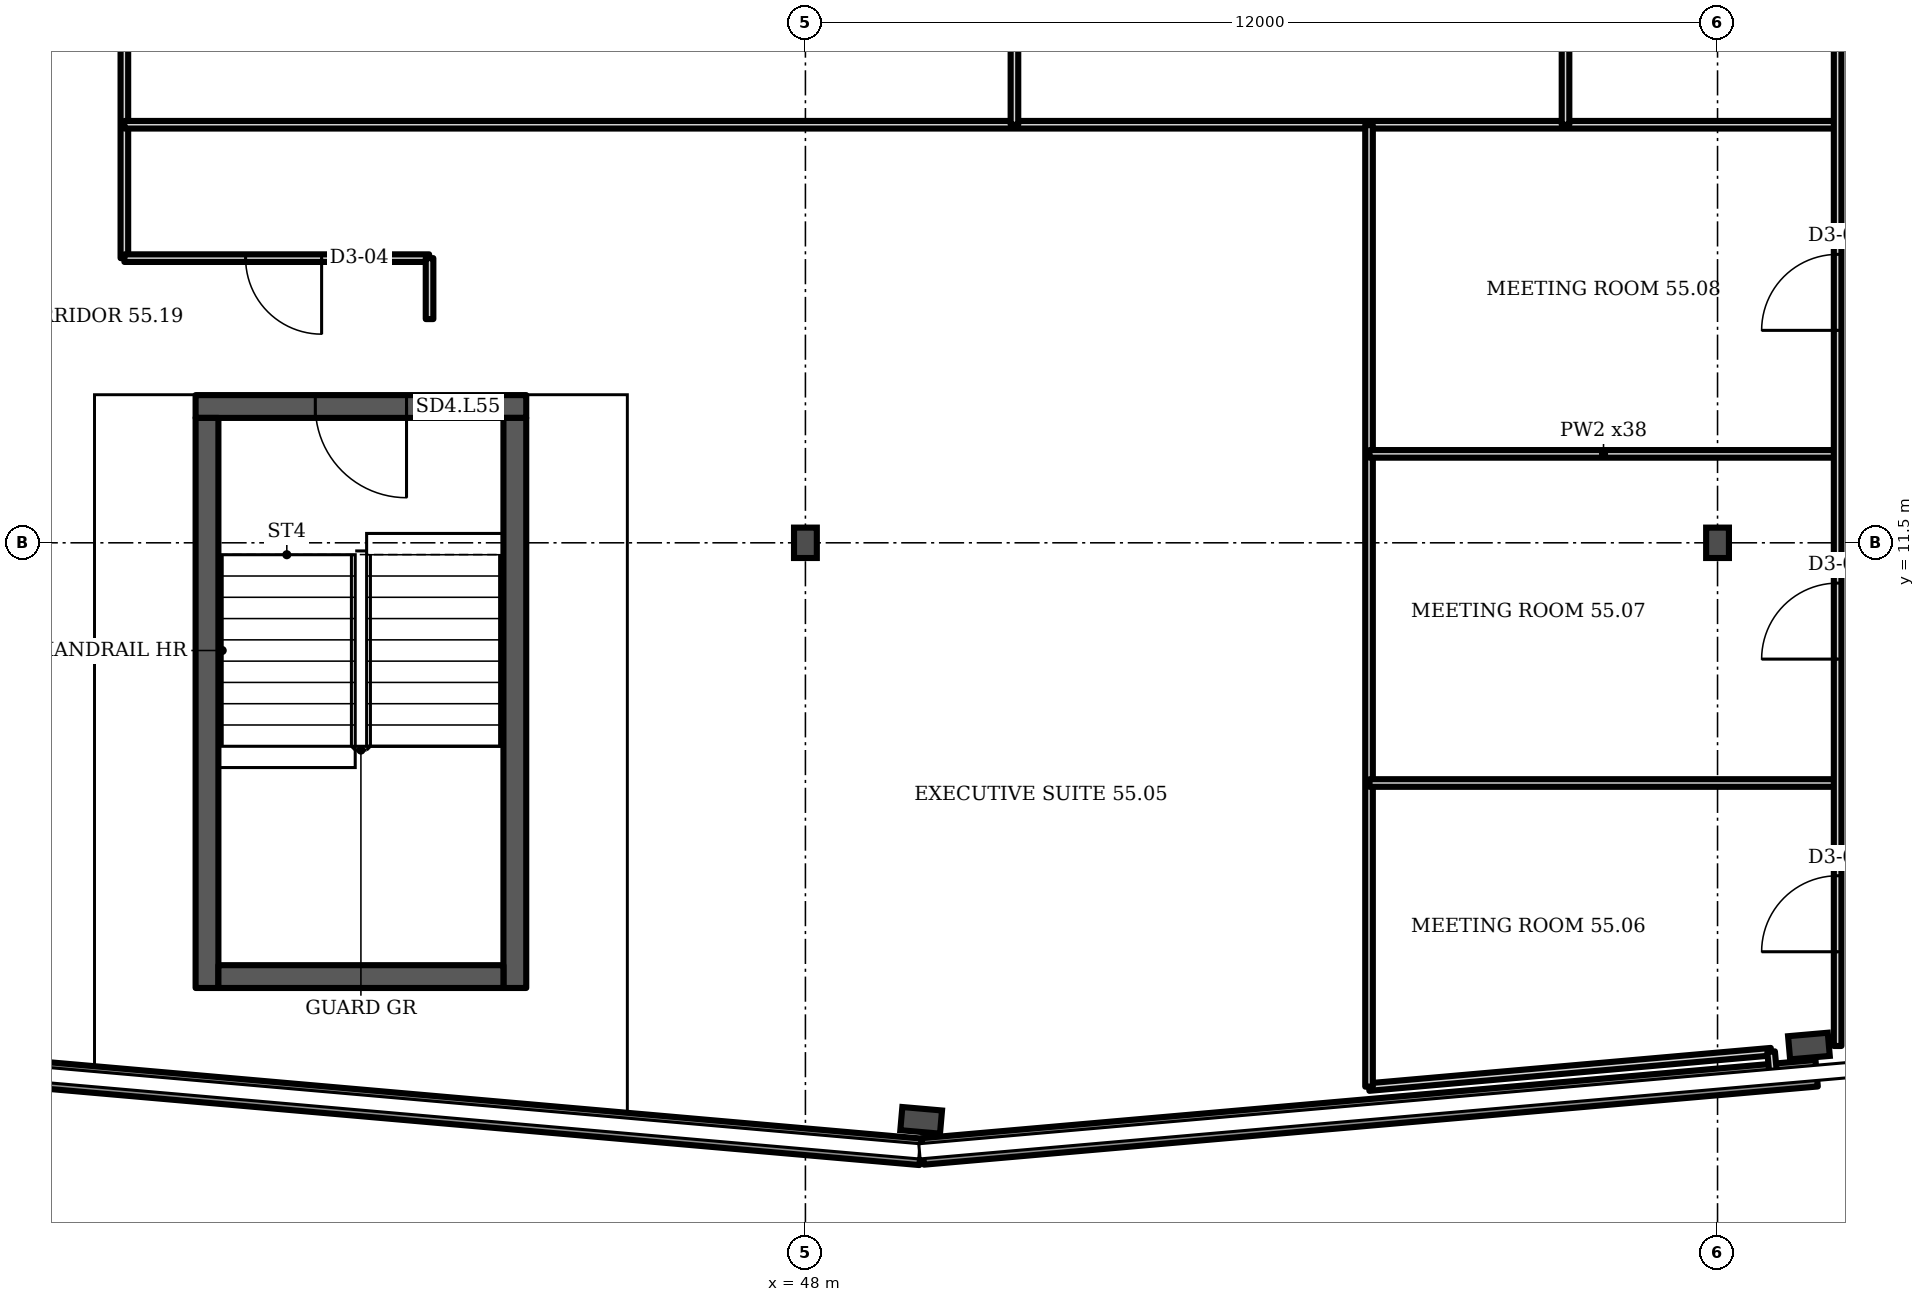
"""IFC4 building model, lengths in metres.
Left out: names, types, materials, properties, quantities, classifications, styles, units other than length and angle.
Written with IfcOpenShell. Run it as: python <this file> out.ifc"""

import sys

from ifc_helpers import new_model, si_unit, direction, frame, frame_2d, origin, origin_2d, place, context, subcontext, project, spatial, rectangle, i_section, extrude, element, fill, save


model = new_model("IFC4")
c1 = context("Model", 3, precision=1e-05, world=origin(), true_north=direction((0.0, 1.0)))
c2 = subcontext(c1, "Body", "Model", "MODEL_VIEW")
j1 = project(units=[si_unit("LENGTHUNIT", "METRE"), si_unit("PLANEANGLEUNIT", "RADIAN")], contexts=[c1])
p1 = place(None, origin())
s1 = spatial("IfcSite", under=j1, at=p1, CompositionType="ELEMENT")
p2 = place(p1, origin())
s2 = spatial("IfcBuilding", under=s1, at=p2, CompositionType="ELEMENT")
p3 = place(p2, frame((0.0, 0.0, 221.5)))
s3 = spatial("IfcBuildingStorey", under=s2, at=p3, CompositionType="ELEMENT", Elevation=221.5)
for number, where, z_axis, x_axis in (
    (1, (49.523, 3.902, 0.0), (0.0, 0.0, 1.0), (-0.087, -0.996, 0.0)),
    (2, (61.202, 4.879, 0.0), (0.0, 0.0, 1.0), (0.087, -0.996, 0.0)),
):
    element("IfcColumn", number, at=place(p3, frame(where, z_axis=z_axis, x_axis=x_axis)), inside=s3, PredefinedType="COLUMN", context=c2, shape_type="SweptSolid", body=[
        extrude(i_section(OverallWidth=0.306, OverallDepth=0.524, WebThickness=0.021, FlangeThickness=0.04, FilletRadius=0.027, at=origin_2d()), origin(), (0.0, 0.0, 1.0), 3.6),
    ])
for number, where, z_axis, x_axis in (
    (3, (48.0, 11.5, 0.0), (0.0, 0.0, 1.0), (1.0, 0.0, 0.0)),
    (4, (60.0, 11.5, 0.0), (0.0, 0.0, 1.0), (1.0, 0.0, 0.0)),
):
    element("IfcColumn", number, at=place(p3, frame(where, z_axis=z_axis, x_axis=x_axis)), inside=s3, PredefinedType="COLUMN", context=c2, shape_type="SweptSolid", body=[
        extrude(i_section(OverallWidth=0.3, OverallDepth=0.4, WebThickness=0.013, FlangeThickness=0.024, FilletRadius=0.027, at=origin_2d()), origin(), (0.0, 0.0, 1.0), 3.6),
    ])
p4 = place(p3, frame((37.729, 4.519, 0.0), z_axis=(0.0, 0.0, 1.0), x_axis=(0.99619, -0.087167, 0.0)))
e5 = element("IfcWall", 5, at=p4, inside=s3, PredefinedType="SOLIDWALL", context=c2, shape_type="SweptSolid", body=[
    extrude(rectangle(XDim=11.831, YDim=0.35, at=frame_2d((5.915, 0.0))), origin(), (0.0, 0.0, 1.0), 1.0),
])
p5 = place(p3, frame((49.545, 3.493, 0.0), z_axis=(0.0, 0.0, 1.0), x_axis=(0.996196, 0.087141, 0.0)))
e6 = element("IfcWall", 6, at=p5, inside=s3, PredefinedType="SOLIDWALL", context=c2, shape_type="SweptSolid", body=[
    extrude(rectangle(XDim=11.803, YDim=0.35, at=frame_2d((5.902, 0.0))), origin(), (0.0, 0.0, 1.0), 1.0),
])
p6 = place(p3, frame((39.977, 13.293, 0.0), z_axis=(0.0, 0.0, 1.0), x_axis=(1.0, 0.0, 0.0)))
e7 = element("IfcWall", 7, at=p6, inside=s3, PredefinedType="SHEAR", context=c2, shape_type="SweptSolid", body=[
    extrude(rectangle(XDim=4.35, YDim=0.3, at=frame_2d((2.175, 0.0))), origin(), (0.0, 0.0, 1.0), 3.2),
])
p7 = place(p6, frame((1.575, 0.0, 0.0)))
e8 = element("IfcOpeningElement", 8, at=p7, cuts=e7, PredefinedType="OPENING", context=c2, shape_type="SweptSolid", body=[
    extrude(rectangle(XDim=1.2, YDim=2.1, at=frame_2d((0.6, 1.05))), frame((0.0, 0.16, 0.0), z_axis=(0.0, -1.0, 0.0), x_axis=(1.0, 0.0, 0.0)), (0.0, 0.0, 1.0), 0.32),
])
p8 = place(p3, frame((39.04, 15.245, 0.0), z_axis=(0.0, 0.0, 1.0), x_axis=(0.0, 1.0, 0.0)))
e9 = element("IfcWall", 9, at=p8, inside=s3, PredefinedType="PARTITIONING", context=c2, shape_type="SweptSolid", body=[
    extrude(rectangle(XDim=15.255, YDim=0.1, at=frame_2d((7.627, 0.0))), origin(), (0.0, 0.0, 1.0), 3.2),
])
p9 = place(p8, frame((3.575, 0.0, 0.0)))
e10 = element("IfcOpeningElement", 10, at=p9, cuts=e9, PredefinedType="OPENING", context=c2, shape_type="SweptSolid", body=[
    extrude(rectangle(XDim=1.0, YDim=2.1, at=frame_2d((0.5, 1.05))), frame((0.0, 0.06, 0.0), z_axis=(0.0, -1.0, 0.0), x_axis=(1.0, 0.0, 0.0)), (0.0, 0.0, 1.0), 0.12),
])
p10 = place(p8, frame((8.075, 0.0, 0.0)))
e11 = element("IfcOpeningElement", 11, at=p10, cuts=e9, PredefinedType="OPENING", context=c2, shape_type="SweptSolid", body=[
    extrude(rectangle(XDim=1.0, YDim=2.1, at=frame_2d((0.5, 1.05))), frame((0.0, 0.06, 0.0), z_axis=(0.0, -1.0, 0.0), x_axis=(1.0, 0.0, 0.0)), (0.0, 0.0, 1.0), 0.12),
])
p11 = place(p3, frame((39.04, 15.245, 0.0), z_axis=(0.0, 0.0, 1.0), x_axis=(1.0, 0.0, 0.0)))
e12 = element("IfcWall", 12, at=p11, inside=s3, PredefinedType="PARTITIONING", context=c2, shape_type="SweptSolid", body=[
    extrude(rectangle(XDim=4.01, YDim=0.1, at=frame_2d((2.005, 0.0))), origin(), (0.0, 0.0, 1.0), 3.2),
])
p12 = place(p11, frame((1.595, 0.0, 0.0)))
e13 = element("IfcOpeningElement", 13, at=p12, cuts=e12, PredefinedType="OPENING", context=c2, shape_type="SweptSolid", body=[
    extrude(rectangle(XDim=1.0, YDim=2.1, at=frame_2d((0.5, 1.05))), frame((0.0, 0.06, 0.0), z_axis=(0.0, -1.0, 0.0), x_axis=(1.0, 0.0, 0.0)), (0.0, 0.0, 1.0), 0.12),
])
p13 = place(p3, frame((39.04, 17.0, 0.0), z_axis=(0.0, 0.0, 1.0), x_axis=(1.0, 0.0, 0.0)))
e14 = element("IfcWall", 14, at=p13, inside=s3, PredefinedType="PARTITIONING", context=c2, shape_type="SweptSolid", body=[
    extrude(rectangle(XDim=22.54, YDim=0.1, at=frame_2d((11.27, 0.0))), origin(), (0.0, 0.0, 1.0), 3.2),
])
p14 = place(p3, frame((43.055, 14.443, 0.0), z_axis=(0.0, 0.0, 1.0), x_axis=(0.0, 1.0, 0.0)))
e15 = element("IfcWall", 15, at=p14, inside=s3, PredefinedType="PARTITIONING", context=c2, shape_type="SweptSolid", body=[
    extrude(rectangle(XDim=0.802, YDim=0.1, at=frame_2d((0.401, 0.0))), origin(), (0.0, 0.0, 1.0), 3.2),
])
p15 = place(p3, frame((50.75, 17.0, 0.0), z_axis=(0.0, 0.0, 1.0), x_axis=(0.0, 1.0, 0.0)))
e16 = element("IfcWall", 16, at=p15, inside=s3, PredefinedType="PARTITIONING", context=c2, shape_type="SweptSolid", body=[
    extrude(rectangle(XDim=9.0, YDim=0.1, at=frame_2d((4.5, 0.0))), origin(), (0.0, 0.0, 1.0), 3.2),
])
p16 = place(p3, frame((55.415, 4.34, 0.0), z_axis=(0.0, 0.0, 1.0), x_axis=(0.996159, 0.087534, 0.0)))
e17 = element("IfcWall", 17, at=p16, inside=s3, PredefinedType="PARTITIONING", context=c2, shape_type="SweptSolid", body=[
    extrude(rectangle(XDim=5.31, YDim=0.1, at=frame_2d((2.655, 0.0))), origin(), (0.0, 0.0, 1.0), 2.58),
])
p17 = place(p3, frame((55.415, 4.345, 0.0), z_axis=(0.0, 0.0, 1.0), x_axis=(0.0, 1.0, 0.0)))
e18 = element("IfcWall", 18, at=p17, inside=s3, PredefinedType="PARTITIONING", context=c2, shape_type="SweptSolid", body=[
    extrude(rectangle(XDim=12.65, YDim=0.1, at=frame_2d((6.325, 0.0))), origin(), (0.0, 0.0, 1.0), 3.2),
])
for number, where, z_axis, x_axis in (
    (19, (55.42, 8.34, 0.0), (0.0, 0.0, 1.0), (1.0, 0.0, 0.0)),
    (20, (55.42, 12.67, 0.0), (0.0, 0.0, 1.0), (1.0, 0.0, 0.0)),
):
    element("IfcWall", number, at=place(p3, frame(where, z_axis=z_axis, x_axis=x_axis)), inside=s3, PredefinedType="PARTITIONING", context=c2, shape_type="SweptSolid", body=[
        extrude(rectangle(XDim=6.16, YDim=0.1, at=frame_2d((3.08, 0.0))), origin(), (0.0, 0.0, 1.0), 3.2),
    ])
p18 = place(p3, frame((58.0, 17.0, 0.0), z_axis=(0.0, 0.0, 1.0), x_axis=(0.0, 1.0, 0.0)))
e21 = element("IfcWall", 21, at=p18, inside=s3, PredefinedType="PARTITIONING", context=c2, shape_type="SweptSolid", body=[
    extrude(rectangle(XDim=13.5, YDim=0.1, at=frame_2d((6.75, 0.0))), origin(), (0.0, 0.0, 1.0), 3.2),
])
p19 = place(p3, frame((60.733, 4.497, 0.0), z_axis=(0.0, 0.0, 1.0), x_axis=(-0.090037, 0.995936, 0.0)))
e22 = element("IfcWall", 22, at=p19, inside=s3, PredefinedType="PARTITIONING", context=c2, shape_type="SweptSolid", body=[
    extrude(rectangle(XDim=0.309, YDim=0.1, at=frame_2d((0.155, 0.0))), origin(), (0.0, 0.0, 1.0), 3.2),
])
p20 = place(p3, frame((61.58, 4.88, 0.0), z_axis=(0.0, 0.0, 1.0), x_axis=(0.0, 1.0, 0.0)))
e23 = element("IfcWall", 23, at=p20, inside=s3, PredefinedType="PARTITIONING", context=c2, shape_type="SweptSolid", body=[
    extrude(rectangle(XDim=24.82, YDim=0.1, at=frame_2d((12.41, 0.0))), origin(), (0.0, 0.0, 1.0), 3.2),
])
p21 = place(p20, frame((1.24, 0.0, 0.0)))
e24 = element("IfcOpeningElement", 24, at=p21, cuts=e23, PredefinedType="OPENING", context=c2, shape_type="SweptSolid", body=[
    extrude(rectangle(XDim=1.0, YDim=2.1, at=frame_2d((0.5, 1.05))), frame((0.0, 0.06, 0.0), z_axis=(0.0, -1.0, 0.0), x_axis=(1.0, 0.0, 0.0)), (0.0, 0.0, 1.0), 0.12),
])
p22 = place(p20, frame((5.09, 0.0, 0.0)))
e25 = element("IfcOpeningElement", 25, at=p22, cuts=e23, PredefinedType="OPENING", context=c2, shape_type="SweptSolid", body=[
    extrude(rectangle(XDim=1.0, YDim=2.1, at=frame_2d((0.5, 1.05))), frame((0.0, 0.06, 0.0), z_axis=(0.0, -1.0, 0.0), x_axis=(1.0, 0.0, 0.0)), (0.0, 0.0, 1.0), 0.12),
])
p23 = place(p20, frame((9.415, 0.0, 0.0)))
e26 = element("IfcOpeningElement", 26, at=p23, cuts=e23, PredefinedType="OPENING", context=c2, shape_type="SweptSolid", body=[
    extrude(rectangle(XDim=1.0, YDim=2.1, at=frame_2d((0.5, 1.05))), frame((0.0, 0.06, 0.0), z_axis=(0.0, -1.0, 0.0), x_axis=(1.0, 0.0, 0.0)), (0.0, 0.0, 1.0), 0.12),
])
p24 = place(p20, frame((14.85, 0.0, 0.0)))
e27 = element("IfcOpeningElement", 27, at=p24, cuts=e23, PredefinedType="OPENING", context=c2, shape_type="SweptSolid", body=[
    extrude(rectangle(XDim=1.0, YDim=2.1, at=frame_2d((0.5, 1.05))), frame((0.0, 0.06, 0.0), z_axis=(0.0, -1.0, 0.0), x_axis=(1.0, 0.0, 0.0)), (0.0, 0.0, 1.0), 0.12),
])
p25 = place(p20, frame((22.63, 0.0, 0.0)))
e28 = element("IfcOpeningElement", 28, at=p25, cuts=e23, PredefinedType="OPENING", context=c2, shape_type="SweptSolid", body=[
    extrude(rectangle(XDim=1.0, YDim=2.1, at=frame_2d((0.5, 1.05))), frame((0.0, 0.06, 0.0), z_axis=(0.0, -1.0, 0.0), x_axis=(1.0, 0.0, 0.0)), (0.0, 0.0, 1.0), 0.12),
])
for number, where, z_axis, x_axis in (
    (29, (40.127, 5.643, 0.0), (0.0, 0.0, 1.0), (0.0, 1.0, 0.0)),
    (30, (44.177, 5.643, 0.0), (0.0, 0.0, 1.0), (0.0, 1.0, 0.0)),
):
    element("IfcWall", number, at=place(p3, frame(where, z_axis=z_axis, x_axis=x_axis)), inside=s3, PredefinedType="SHEAR", context=c2, shape_type="SweptSolid", body=[
        extrude(rectangle(XDim=7.5, YDim=0.3, at=frame_2d((3.75, 0.0))), origin(), (0.0, 0.0, 1.0), 3.2),
    ])
p26 = place(p3, frame((40.277, 5.793, 0.0), z_axis=(0.0, 0.0, 1.0), x_axis=(1.0, 0.0, 0.0)))
e31 = element("IfcWall", 31, at=p26, inside=s3, PredefinedType="SHEAR", context=c2, shape_type="SweptSolid", body=[
    extrude(rectangle(XDim=3.75, YDim=0.3, at=frame_2d((1.875, 0.0))), origin(), (0.0, 0.0, 1.0), 3.2),
])
p27 = place(p7, origin())
e32 = element("IfcDoor", 32, at=p27, inside=s3, OperationType="SINGLE_SWING_RIGHT", PredefinedType="DOOR", context=c2, shape_type="SweptSolid", body=[
    extrude(rectangle(XDim=1.2, YDim=2.1, at=frame_2d((0.6, 1.05))), frame((0.0, 0.025, 0.0), z_axis=(0.0, -1.0, 0.0), x_axis=(1.0, 0.0, 0.0)), (0.0, 0.0, 1.0), 0.05),
])
fill(e8, e32)
p28 = place(p21, origin())
e33 = element("IfcDoor", 33, at=p28, inside=s3, OperationType="SINGLE_SWING_LEFT", PredefinedType="DOOR", context=c2, shape_type="SweptSolid", body=[
    extrude(rectangle(XDim=1.0, YDim=2.1, at=frame_2d((0.5, 1.05))), frame((0.0, 0.025, 0.0), z_axis=(0.0, -1.0, 0.0), x_axis=(1.0, 0.0, 0.0)), (0.0, 0.0, 1.0), 0.05),
])
fill(e24, e33)
p29 = place(p22, origin())
e34 = element("IfcDoor", 34, at=p29, inside=s3, OperationType="SINGLE_SWING_LEFT", PredefinedType="DOOR", context=c2, shape_type="SweptSolid", body=[
    extrude(rectangle(XDim=1.0, YDim=2.1, at=frame_2d((0.5, 1.05))), frame((0.0, 0.025, 0.0), z_axis=(0.0, -1.0, 0.0), x_axis=(1.0, 0.0, 0.0)), (0.0, 0.0, 1.0), 0.05),
])
fill(e25, e34)
p30 = place(p23, origin())
e35 = element("IfcDoor", 35, at=p30, inside=s3, OperationType="SINGLE_SWING_LEFT", PredefinedType="DOOR", context=c2, shape_type="SweptSolid", body=[
    extrude(rectangle(XDim=1.0, YDim=2.1, at=frame_2d((0.5, 1.05))), frame((0.0, 0.025, 0.0), z_axis=(0.0, -1.0, 0.0), x_axis=(1.0, 0.0, 0.0)), (0.0, 0.0, 1.0), 0.05),
])
fill(e26, e35)
p31 = place(p12, origin())
e36 = element("IfcDoor", 36, at=p31, inside=s3, OperationType="SINGLE_SWING_RIGHT", PredefinedType="DOOR", context=c2, shape_type="SweptSolid", body=[
    extrude(rectangle(XDim=1.0, YDim=2.1, at=frame_2d((0.5, 1.05))), frame((0.0, 0.025, 0.0), z_axis=(0.0, -1.0, 0.0), x_axis=(1.0, 0.0, 0.0)), (0.0, 0.0, 1.0), 0.05),
])
fill(e13, e36)
save(model, sys.argv[1])
